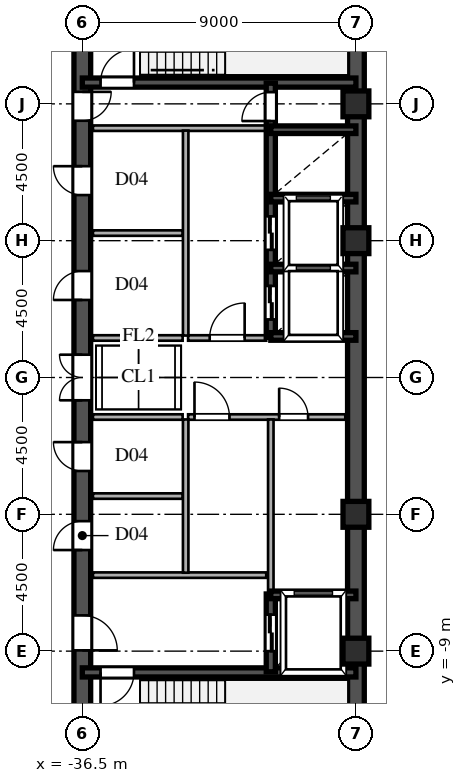
"""IFC4 building model, lengths in metres.
Left out: names, types, materials, properties, quantities, classifications, styles, units other than length and angle.
Written with IfcOpenShell. Run it as: python <this file> out.ifc"""

import sys

from ifc_helpers import new_model, si_unit, direction, frame, frame_2d, origin, origin_2d, place, context, subcontext, project, spatial, rectangle, hollow_rectangle, extrude, source, transform, mapped, element, fill, save


model = new_model("IFC4")
c1 = context("Model", 3, precision=1e-05, world=origin(), true_north=direction((0.0, 1.0)))
c2 = subcontext(c1, "Body", "Model", "MODEL_VIEW")
j1 = project(units=[si_unit("LENGTHUNIT", "METRE"), si_unit("PLANEANGLEUNIT", "RADIAN")], contexts=[c1])
p1 = place(None, origin())
s1 = spatial("IfcSite", under=j1, at=p1, CompositionType="ELEMENT")
p2 = place(p1, origin())
s2 = spatial("IfcBuilding", under=s1, at=p2, CompositionType="ELEMENT")
p3 = place(p2, frame((0.0, 0.0, 206.7)))
s3 = spatial("IfcBuildingStorey", under=s2, at=p3, CompositionType="ELEMENT", Elevation=206.7)
m1 = source(origin(), c2, "Body", "SweptSolid", [
    extrude(hollow_rectangle(XDim=0.85, YDim=0.85, WallThickness=0.036, at=origin_2d()), origin(), (0.0, 0.0, 1.0), 3.6),
])
for number, where, z_axis, x_axis in (
    (1, (-27.5, -9.0, 0.0), (0.0, 0.0, 1.0), (1.0, 0.0, 0.0)),
    (2, (-27.5, -4.5, 0.0), (0.0, 0.0, 1.0), (1.0, 0.0, 0.0)),
    (3, (-27.5, 4.5, 0.0), (0.0, 0.0, 1.0), (1.0, 0.0, 0.0)),
    (4, (-27.5, 9.0, 0.0), (0.0, 0.0, 1.0), (1.0, 0.0, 0.0)),
):
    element("IfcColumn", number, at=place(p3, frame(where, z_axis=z_axis, x_axis=x_axis)), inside=s3, PredefinedType="COLUMN", context=c2, shape_type="MappedRepresentation", body=[
        mapped(m1, transform((0.0, 0.0, 0.0), scale=1.0)),
    ])
for number, where, z_axis, x_axis in (
    (5, (-27.5, -13.5, 0.0), (0.0, 0.0, 1.0), (0.0, 1.0, 0.0)),
    (6, (-27.5, 1.3, 0.0), (0.0, 0.0, 1.0), (0.0, 1.0, 0.0)),
):
    element("IfcWall", number, at=place(p3, frame(where, z_axis=z_axis, x_axis=x_axis)), inside=s3, PredefinedType="SHEAR", context=c2, shape_type="SweptSolid", body=[
        extrude(rectangle(XDim=12.2, YDim=0.55, at=frame_2d((6.1, 0.0))), origin(), (0.0, 0.0, 1.0), 3.38),
    ])
p4 = place(p3, frame((-27.5, -1.3, 0.0), z_axis=(0.0, 0.0, 1.0), x_axis=(0.0, 1.0, 0.0)))
e7 = element("IfcWall", 7, at=p4, inside=s3, PredefinedType="SHEAR", context=c2, shape_type="SweptSolid", body=[
    extrude(rectangle(XDim=2.6, YDim=0.55, at=frame_2d((1.3, 0.0))), origin(), (0.0, 0.0, 1.0), 3.38),
])
p5 = place(p3, frame((-36.5, -13.65, 0.0), z_axis=(0.0, 0.0, 1.0), x_axis=(0.0, 1.0, 0.0)))
e8 = element("IfcWall", 8, at=p5, inside=s3, PredefinedType="SHEAR", context=c2, shape_type="SweptSolid", body=[
    extrude(rectangle(XDim=7.15, YDim=0.55, at=frame_2d((3.575, 0.0))), origin(), (0.0, 0.0, 1.0), 3.38),
])
p6 = place(p5, frame((4.675, 0.0, 0.0)))
e9 = element("IfcOpeningElement", 9, at=p6, cuts=e8, PredefinedType="OPENING", context=c2, shape_type="SweptSolid", body=[
    extrude(rectangle(XDim=1.15, YDim=2.2, at=frame_2d((0.575, 1.1))), frame((0.0, 0.285, 0.0), z_axis=(0.0, -1.0, 0.0), x_axis=(1.0, 0.0, 0.0)), (0.0, 0.0, 1.0), 0.57),
])
p7 = place(p3, frame((-36.5, -1.3, 0.0), z_axis=(0.0, 0.0, 1.0), x_axis=(0.0, 1.0, 0.0)))
e10 = element("IfcWall", 10, at=p7, inside=s3, PredefinedType="SHEAR", context=c2, shape_type="SweptSolid", body=[
    extrude(rectangle(XDim=2.6, YDim=0.55, at=frame_2d((1.3, 0.0))), origin(), (0.0, 0.0, 1.0), 3.38),
])
p8 = place(p7, frame((0.55, 0.0, 0.0)))
e11 = element("IfcOpeningElement", 11, at=p8, cuts=e10, PredefinedType="OPENING", context=c2, shape_type="SweptSolid", body=[
    extrude(rectangle(XDim=1.5, YDim=2.3, at=frame_2d((0.75, 1.15))), frame((0.0, 0.285, 0.0), z_axis=(0.0, -1.0, 0.0), x_axis=(1.0, 0.0, 0.0)), (0.0, 0.0, 1.0), 0.57),
])
p9 = place(p3, frame((-36.5, 8.2, 0.0), z_axis=(0.0, 0.0, 1.0), x_axis=(0.0, 1.0, 0.0)))
e12 = element("IfcWall", 12, at=p9, inside=s3, PredefinedType="SHEAR", context=c2, shape_type="SweptSolid", body=[
    extrude(rectangle(XDim=5.45, YDim=0.55, at=frame_2d((2.725, 0.0))), origin(), (0.0, 0.0, 1.0), 3.38),
])
p10 = place(p9, frame((0.245, 0.0, 0.0)))
e13 = element("IfcOpeningElement", 13, at=p10, cuts=e12, PredefinedType="OPENING", context=c2, shape_type="SweptSolid", body=[
    extrude(rectangle(XDim=0.95, YDim=2.15, at=frame_2d((0.475, 1.075))), frame((0.0, 0.285, 0.0), z_axis=(0.0, -1.0, 0.0), x_axis=(1.0, 0.0, 0.0)), (0.0, 0.0, 1.0), 0.57),
])
p11 = place(p3, frame((-36.5, -6.5, 0.0), z_axis=(0.0, 0.0, 1.0), x_axis=(0.0, 1.0, 0.0)))
e14 = element("IfcWall", 14, at=p11, inside=s3, PredefinedType="SHEAR", context=c2, shape_type="SweptSolid", body=[
    extrude(rectangle(XDim=2.6, YDim=0.55, at=frame_2d((1.3, 0.0))), origin(), (0.0, 0.0, 1.0), 3.38),
])
p12 = place(p11, frame((0.825, 0.0, 0.0)))
e15 = element("IfcOpeningElement", 15, at=p12, cuts=e14, PredefinedType="OPENING", context=c2, shape_type="SweptSolid", body=[
    extrude(rectangle(XDim=0.95, YDim=2.15, at=frame_2d((0.475, 1.075))), frame((0.0, 0.285, 0.0), z_axis=(0.0, -1.0, 0.0), x_axis=(1.0, 0.0, 0.0)), (0.0, 0.0, 1.0), 0.57),
])
p13 = place(p3, frame((-36.5, -3.9, 0.0), z_axis=(0.0, 0.0, 1.0), x_axis=(0.0, 1.0, 0.0)))
e16 = element("IfcWall", 16, at=p13, inside=s3, PredefinedType="SHEAR", context=c2, shape_type="SweptSolid", body=[
    extrude(rectangle(XDim=2.6, YDim=0.55, at=frame_2d((1.3, 0.0))), origin(), (0.0, 0.0, 1.0), 3.38),
])
p14 = place(p13, frame((0.825, 0.0, 0.0)))
e17 = element("IfcOpeningElement", 17, at=p14, cuts=e16, PredefinedType="OPENING", context=c2, shape_type="SweptSolid", body=[
    extrude(rectangle(XDim=0.95, YDim=2.15, at=frame_2d((0.475, 1.075))), frame((0.0, 0.285, 0.0), z_axis=(0.0, -1.0, 0.0), x_axis=(1.0, 0.0, 0.0)), (0.0, 0.0, 1.0), 0.57),
])
p15 = place(p3, frame((-36.5, 1.3, 0.0), z_axis=(0.0, 0.0, 1.0), x_axis=(0.0, 1.0, 0.0)))
e18 = element("IfcWall", 18, at=p15, inside=s3, PredefinedType="SHEAR", context=c2, shape_type="SweptSolid", body=[
    extrude(rectangle(XDim=3.45, YDim=0.55, at=frame_2d((1.725, 0.0))), origin(), (0.0, 0.0, 1.0), 3.38),
])
p16 = place(p15, frame((1.25, 0.0, 0.0)))
e19 = element("IfcOpeningElement", 19, at=p16, cuts=e18, PredefinedType="OPENING", context=c2, shape_type="SweptSolid", body=[
    extrude(rectangle(XDim=0.95, YDim=2.15, at=frame_2d((0.475, 1.075))), frame((0.0, 0.285, 0.0), z_axis=(0.0, -1.0, 0.0), x_axis=(1.0, 0.0, 0.0)), (0.0, 0.0, 1.0), 0.57),
])
p17 = place(p3, frame((-36.5, 4.75, 0.0), z_axis=(0.0, 0.0, 1.0), x_axis=(0.0, 1.0, 0.0)))
e20 = element("IfcWall", 20, at=p17, inside=s3, PredefinedType="SHEAR", context=c2, shape_type="SweptSolid", body=[
    extrude(rectangle(XDim=3.45, YDim=0.55, at=frame_2d((1.725, 0.0))), origin(), (0.0, 0.0, 1.0), 3.38),
])
p18 = place(p17, frame((1.25, 0.0, 0.0)))
e21 = element("IfcOpeningElement", 21, at=p18, cuts=e20, PredefinedType="OPENING", context=c2, shape_type="SweptSolid", body=[
    extrude(rectangle(XDim=0.95, YDim=2.15, at=frame_2d((0.475, 1.075))), frame((0.0, 0.285, 0.0), z_axis=(0.0, -1.0, 0.0), x_axis=(1.0, 0.0, 0.0)), (0.0, 0.0, 1.0), 0.57),
])
p19 = place(p3, frame((-36.5, -9.7, 0.0), z_axis=(0.0, 0.0, 1.0), x_axis=(1.0, 0.0, 0.0)))
e22 = element("IfcWall", 22, at=p19, inside=s3, PredefinedType="SHEAR", context=c2, shape_type="SweptSolid", body=[
    extrude(rectangle(XDim=9.0, YDim=0.3, at=frame_2d((4.5, 0.0))), origin(), (0.0, 0.0, 1.0), 3.38),
])
p20 = place(p19, frame((0.6, 0.0, 0.0)))
e23 = element("IfcOpeningElement", 23, at=p20, cuts=e22, PredefinedType="OPENING", context=c2, shape_type="SweptSolid", body=[
    extrude(rectangle(XDim=1.1, YDim=2.2, at=frame_2d((0.55, 1.1))), frame((0.0, 0.16, 0.0), z_axis=(0.0, -1.0, 0.0), x_axis=(1.0, 0.0, 0.0)), (0.0, 0.0, 1.0), 0.32),
])
p21 = place(p3, frame((-36.5, 9.7, 0.0), z_axis=(0.0, 0.0, 1.0), x_axis=(1.0, 0.0, 0.0)))
e24 = element("IfcWall", 24, at=p21, inside=s3, PredefinedType="SHEAR", context=c2, shape_type="SweptSolid", body=[
    extrude(rectangle(XDim=9.0, YDim=0.3, at=frame_2d((4.5, 0.0))), origin(), (0.0, 0.0, 1.0), 3.38),
])
p22 = place(p21, frame((0.6, 0.0, 0.0)))
e25 = element("IfcOpeningElement", 25, at=p22, cuts=e24, PredefinedType="OPENING", context=c2, shape_type="SweptSolid", body=[
    extrude(rectangle(XDim=1.1, YDim=2.2, at=frame_2d((0.55, 1.1))), frame((0.0, 0.16, 0.0), z_axis=(0.0, -1.0, 0.0), x_axis=(1.0, 0.0, 0.0)), (0.0, 0.0, 1.0), 0.32),
])
for number, where, z_axis, x_axis in (
    (26, (-30.3, -7.15, 0.0), (0.0, 0.0, 1.0), (1.0, 0.0, 0.0)),
    (27, (-30.3, 1.35, 0.0), (0.0, 0.0, 1.0), (1.0, 0.0, 0.0)),
    (28, (-30.3, 3.6, 0.0), (0.0, 0.0, 1.0), (1.0, 0.0, 0.0)),
    (29, (-30.3, 5.9, 0.0), (0.0, 0.0, 1.0), (1.0, 0.0, 0.0)),
    (30, (-30.3, 8.15, 0.0), (0.0, 0.0, 1.0), (1.0, 0.0, 0.0)),
):
    element("IfcWall", number, at=place(p3, frame(where, z_axis=z_axis, x_axis=x_axis)), inside=s3, PredefinedType="SHEAR", context=c2, shape_type="SweptSolid", body=[
        extrude(rectangle(XDim=2.8, YDim=0.25, at=frame_2d((1.4, 0.0))), origin(), (0.0, 0.0, 1.0), 3.38),
    ])
p23 = place(p3, frame((-30.3, -9.68, 0.0), z_axis=(0.0, 0.0, 1.0), x_axis=(0.0, 1.0, 0.0)))
e31 = element("IfcWall", 31, at=p23, inside=s3, PredefinedType="SHEAR", context=c2, shape_type="SweptSolid", body=[
    extrude(rectangle(XDim=2.56, YDim=0.3, at=frame_2d((1.28, 0.0))), origin(), (0.0, 0.0, 1.0), 3.38),
])
p24 = place(p23, frame((0.68, 0.0, 0.0)))
e32 = element("IfcOpeningElement", 32, at=p24, cuts=e31, PredefinedType="OPENING", context=c2, shape_type="SweptSolid", body=[
    extrude(rectangle(XDim=1.2, YDim=2.25, at=frame_2d((0.6, 1.125))), frame((0.0, 0.16, 0.0), z_axis=(0.0, -1.0, 0.0), x_axis=(1.0, 0.0, 0.0)), (0.0, 0.0, 1.0), 0.32),
])
p25 = place(p3, frame((-30.3, 1.32, 0.0), z_axis=(0.0, 0.0, 1.0), x_axis=(0.0, 1.0, 0.0)))
e33 = element("IfcWall", 33, at=p25, inside=s3, PredefinedType="SHEAR", context=c2, shape_type="SweptSolid", body=[
    extrude(rectangle(XDim=2.28, YDim=0.3, at=frame_2d((1.14, 0.0))), origin(), (0.0, 0.0, 1.0), 3.38),
])
p26 = place(p25, frame((0.59, 0.0, 0.0)))
e34 = element("IfcOpeningElement", 34, at=p26, cuts=e33, PredefinedType="OPENING", context=c2, shape_type="SweptSolid", body=[
    extrude(rectangle(XDim=1.1, YDim=2.2, at=frame_2d((0.55, 1.1))), frame((0.0, 0.16, 0.0), z_axis=(0.0, -1.0, 0.0), x_axis=(1.0, 0.0, 0.0)), (0.0, 0.0, 1.0), 0.32),
])
p27 = place(p3, frame((-30.3, 3.6, 0.0), z_axis=(0.0, 0.0, 1.0), x_axis=(0.0, 1.0, 0.0)))
e35 = element("IfcWall", 35, at=p27, inside=s3, PredefinedType="SHEAR", context=c2, shape_type="SweptSolid", body=[
    extrude(rectangle(XDim=2.3, YDim=0.3, at=frame_2d((1.15, 0.0))), origin(), (0.0, 0.0, 1.0), 3.38),
])
p28 = place(p27, frame((0.6, 0.0, 0.0)))
e36 = element("IfcOpeningElement", 36, at=p28, cuts=e35, PredefinedType="OPENING", context=c2, shape_type="SweptSolid", body=[
    extrude(rectangle(XDim=1.1, YDim=2.2, at=frame_2d((0.55, 1.1))), frame((0.0, 0.16, 0.0), z_axis=(0.0, -1.0, 0.0), x_axis=(1.0, 0.0, 0.0)), (0.0, 0.0, 1.0), 0.32),
])
p29 = place(p3, frame((-30.3, 5.9, 0.0), z_axis=(0.0, 0.0, 1.0), x_axis=(0.0, 1.0, 0.0)))
e37 = element("IfcWall", 37, at=p29, inside=s3, PredefinedType="SHEAR", context=c2, shape_type="SweptSolid", body=[
    extrude(rectangle(XDim=2.25, YDim=0.3, at=frame_2d((1.125, 0.0))), origin(), (0.0, 0.0, 1.0), 3.38),
])
p30 = place(p3, frame((-30.3, 8.15, 0.0), z_axis=(0.0, 0.0, 1.0), x_axis=(0.0, 1.0, 0.0)))
e38 = element("IfcWall", 38, at=p30, inside=s3, PredefinedType="SHEAR", context=c2, shape_type="SweptSolid", body=[
    extrude(rectangle(XDim=1.53, YDim=0.3, at=frame_2d((0.765, 0.0))), origin(), (0.0, 0.0, 1.0), 3.38),
])
p31 = place(p30, frame((0.285, 0.0, 0.0)))
e39 = element("IfcOpeningElement", 39, at=p31, cuts=e38, PredefinedType="OPENING", context=c2, shape_type="SweptSolid", body=[
    extrude(rectangle(XDim=0.95, YDim=2.15, at=frame_2d((0.475, 1.075))), frame((0.0, 0.16, 0.0), z_axis=(0.0, -1.0, 0.0), x_axis=(1.0, 0.0, 0.0)), (0.0, 0.0, 1.0), 0.32),
])
for number, where, z_axis, x_axis in (
    (40, (-36.15, -6.5, 0.0), (0.0, 0.0, 1.0), (1.0, 0.0, 0.0)),
    (41, (-36.15, 8.2, 0.0), (0.0, 0.0, 1.0), (1.0, 0.0, 0.0)),
):
    element("IfcWall", number, at=place(p3, frame(where, z_axis=z_axis, x_axis=x_axis)), inside=s3, PredefinedType="PARTITIONING", context=c2, shape_type="SweptSolid", body=[
        extrude(rectangle(XDim=5.7, YDim=0.18, at=frame_2d((2.85, 0.0))), origin(), (0.0, 0.0, 1.0), 3.38),
    ])
p32 = place(p3, frame((-33.1, -6.42, 0.0), z_axis=(0.0, 0.0, 1.0), x_axis=(0.0, 1.0, 0.0)))
e42 = element("IfcWall", 42, at=p32, inside=s3, PredefinedType="PARTITIONING", context=c2, shape_type="SweptSolid", body=[
    extrude(rectangle(XDim=5.04, YDim=0.18, at=frame_2d((2.52, 0.0))), origin(), (0.0, 0.0, 1.0), 3.38),
])
p33 = place(p3, frame((-33.1, 1.38, 0.0), z_axis=(0.0, 0.0, 1.0), x_axis=(0.0, 1.0, 0.0)))
e43 = element("IfcWall", 43, at=p33, inside=s3, PredefinedType="PARTITIONING", context=c2, shape_type="SweptSolid", body=[
    extrude(rectangle(XDim=6.74, YDim=0.18, at=frame_2d((3.37, 0.0))), origin(), (0.0, 0.0, 1.0), 3.38),
])
p34 = place(p3, frame((-30.3, -1.3, 0.0), z_axis=(0.0, 0.0, 1.0), x_axis=(1.0, 0.0, 0.0)))
e44 = element("IfcWall", 44, at=p34, inside=s3, PredefinedType="PARTITIONING", context=c2, shape_type="SweptSolid", body=[
    extrude(rectangle(XDim=2.45, YDim=0.18, at=frame_2d((1.225, 0.0))), origin(), (0.0, 0.0, 1.0), 3.38),
])
p35 = place(p34, frame((0.275, 0.0, 0.0)))
e45 = element("IfcOpeningElement", 45, at=p35, cuts=e44, PredefinedType="OPENING", context=c2, shape_type="SweptSolid", body=[
    extrude(rectangle(XDim=0.95, YDim=2.15, at=frame_2d((0.475, 1.075))), frame((0.0, 0.1, 0.0), z_axis=(0.0, -1.0, 0.0), x_axis=(1.0, 0.0, 0.0)), (0.0, 0.0, 1.0), 0.2),
])
p36 = place(p3, frame((-33.02, -1.3, 0.0), z_axis=(0.0, 0.0, 1.0), x_axis=(1.0, 0.0, 0.0)))
e46 = element("IfcWall", 46, at=p36, inside=s3, PredefinedType="PARTITIONING", context=c2, shape_type="SweptSolid", body=[
    extrude(rectangle(XDim=2.72, YDim=0.18, at=frame_2d((1.36, 0.0))), origin(), (0.0, 0.0, 1.0), 3.38),
])
p37 = place(p36, frame((0.21, 0.0, 0.0)))
e47 = element("IfcOpeningElement", 47, at=p37, cuts=e46, PredefinedType="OPENING", context=c2, shape_type="SweptSolid", body=[
    extrude(rectangle(XDim=1.15, YDim=2.2, at=frame_2d((0.575, 1.1))), frame((0.0, 0.1, 0.0), z_axis=(0.0, -1.0, 0.0), x_axis=(1.0, 0.0, 0.0)), (0.0, 0.0, 1.0), 0.2),
])
p38 = place(p3, frame((-30.3, -7.12, 0.0), z_axis=(0.0, 0.0, 1.0), x_axis=(0.0, 1.0, 0.0)))
e48 = element("IfcWall", 48, at=p38, inside=s3, PredefinedType="PARTITIONING", context=c2, shape_type="SweptSolid", body=[
    extrude(rectangle(XDim=5.74, YDim=0.18, at=frame_2d((2.87, 0.0))), origin(), (0.0, 0.0, 1.0), 3.38),
])
p39 = place(p3, frame((-33.02, 1.3, 0.0), z_axis=(0.0, 0.0, 1.0), x_axis=(1.0, 0.0, 0.0)))
e49 = element("IfcWall", 49, at=p39, inside=s3, PredefinedType="PARTITIONING", context=c2, shape_type="SweptSolid", body=[
    extrude(rectangle(XDim=2.57, YDim=0.18, at=frame_2d((1.285, 0.0))), origin(), (0.0, 0.0, 1.0), 3.38),
])
p40 = place(p39, frame((0.71, 0.0, 0.0)))
e50 = element("IfcOpeningElement", 50, at=p40, cuts=e49, PredefinedType="OPENING", context=c2, shape_type="SweptSolid", body=[
    extrude(rectangle(XDim=1.15, YDim=2.2, at=frame_2d((0.575, 1.1))), frame((0.0, 0.1, 0.0), z_axis=(0.0, -1.0, 0.0), x_axis=(1.0, 0.0, 0.0)), (0.0, 0.0, 1.0), 0.2),
])
for number, where, z_axis, x_axis in (
    (51, (-36.15, -1.3, 0.0), (0.0, 0.0, 1.0), (1.0, 0.0, 0.0)),
    (52, (-36.15, 1.3, 0.0), (0.0, 0.0, 1.0), (1.0, 0.0, 0.0)),
    (53, (-36.15, -3.9, 0.0), (0.0, 0.0, 1.0), (1.0, 0.0, 0.0)),
    (54, (-36.15, 4.75, 0.0), (0.0, 0.0, 1.0), (1.0, 0.0, 0.0)),
):
    element("IfcWall", number, at=place(p3, frame(where, z_axis=z_axis, x_axis=x_axis)), inside=s3, PredefinedType="PARTITIONING", context=c2, shape_type="SweptSolid", body=[
        extrude(rectangle(XDim=2.95, YDim=0.18, at=frame_2d((1.475, 0.0))), origin(), (0.0, 0.0, 1.0), 3.38),
    ])
m2 = source(origin(), c2, "Body", "SweptSolid", [
    extrude(rectangle(XDim=1.15, YDim=2.2, at=frame_2d((0.575, 1.1))), frame((0.0, 0.025, 0.0), z_axis=(0.0, -1.0, 0.0), x_axis=(1.0, 0.0, 0.0)), (0.0, 0.0, 1.0), 0.05),
])
p41 = place(p6, frame((1.15, 0.0, 0.0), z_axis=(0.0, 0.0, 1.0), x_axis=(-1.0, 0.0, 0.0)))
e55 = element("IfcDoor", 55, at=p41, inside=s3, OperationType="SINGLE_SWING_LEFT", PredefinedType="DOOR", context=c2, shape_type="MappedRepresentation", body=[
    mapped(m2, transform((0.0, 0.0, 0.0), scale=1.0)),
])
fill(e9, e55)
m3 = source(origin(), c2, "Body", "SweptSolid", [
    extrude(rectangle(XDim=1.5, YDim=2.3, at=frame_2d((0.75, 1.15))), frame((0.0, 0.025, 0.0), z_axis=(0.0, -1.0, 0.0), x_axis=(1.0, 0.0, 0.0)), (0.0, 0.0, 1.0), 0.05),
])
p42 = place(p8, origin())
e56 = element("IfcDoor", 56, at=p42, inside=s3, OperationType="DOUBLE_SWING_LEFT", PredefinedType="DOOR", context=c2, shape_type="MappedRepresentation", body=[
    mapped(m3, transform((0.0, 0.0, 0.0), scale=1.0)),
])
fill(e11, e56)
m4 = source(origin(), c2, "Body", "SweptSolid", [
    extrude(rectangle(XDim=0.95, YDim=2.15, at=frame_2d((0.475, 1.075))), frame((0.0, 0.025, 0.0), z_axis=(0.0, -1.0, 0.0), x_axis=(1.0, 0.0, 0.0)), (0.0, 0.0, 1.0), 0.05),
])
p43 = place(p10, frame((0.95, 0.0, 0.0), z_axis=(0.0, 0.0, 1.0), x_axis=(-1.0, 0.0, 0.0)))
e57 = element("IfcDoor", 57, at=p43, inside=s3, OperationType="SINGLE_SWING_RIGHT", PredefinedType="DOOR", context=c2, shape_type="MappedRepresentation", body=[
    mapped(m4, transform((0.0, 0.0, 0.0), scale=1.0)),
])
fill(e13, e57)
p44 = place(p12, origin())
e58 = element("IfcDoor", 58, at=p44, inside=s3, OperationType="SINGLE_SWING_LEFT", PredefinedType="DOOR", context=c2, shape_type="MappedRepresentation", body=[
    mapped(m4, transform((0.0, 0.0, 0.0), scale=1.0)),
])
fill(e15, e58)
p45 = place(p14, origin())
e59 = element("IfcDoor", 59, at=p45, inside=s3, OperationType="SINGLE_SWING_RIGHT", PredefinedType="DOOR", context=c2, shape_type="MappedRepresentation", body=[
    mapped(m4, transform((0.0, 0.0, 0.0), scale=1.0)),
])
fill(e17, e59)
p46 = place(p16, origin())
e60 = element("IfcDoor", 60, at=p46, inside=s3, OperationType="SINGLE_SWING_LEFT", PredefinedType="DOOR", context=c2, shape_type="MappedRepresentation", body=[
    mapped(m4, transform((0.0, 0.0, 0.0), scale=1.0)),
])
fill(e19, e60)
p47 = place(p18, origin())
e61 = element("IfcDoor", 61, at=p47, inside=s3, OperationType="SINGLE_SWING_RIGHT", PredefinedType="DOOR", context=c2, shape_type="MappedRepresentation", body=[
    mapped(m4, transform((0.0, 0.0, 0.0), scale=1.0)),
])
fill(e21, e61)
m5 = source(origin(), c2, "Body", "SweptSolid", [
    extrude(rectangle(XDim=1.1, YDim=2.2, at=frame_2d((0.55, 1.1))), frame((0.0, 0.025, 0.0), z_axis=(0.0, -1.0, 0.0), x_axis=(1.0, 0.0, 0.0)), (0.0, 0.0, 1.0), 0.05),
])
p48 = place(p20, frame((1.1, 0.0, 0.0), z_axis=(0.0, 0.0, 1.0), x_axis=(-1.0, 0.0, 0.0)))
e62 = element("IfcDoor", 62, at=p48, inside=s3, OperationType="SINGLE_SWING_LEFT", PredefinedType="DOOR", context=c2, shape_type="MappedRepresentation", body=[
    mapped(m5, transform((0.0, 0.0, 0.0), scale=1.0)),
])
fill(e23, e62)
p49 = place(p22, origin())
e63 = element("IfcDoor", 63, at=p49, inside=s3, OperationType="SINGLE_SWING_RIGHT", PredefinedType="DOOR", context=c2, shape_type="MappedRepresentation", body=[
    mapped(m5, transform((0.0, 0.0, 0.0), scale=1.0)),
])
fill(e25, e63)
m6 = source(origin(), c2, "Body", "SweptSolid", [
    extrude(rectangle(XDim=1.2, YDim=2.25, at=frame_2d((0.6, 1.125))), frame((0.0, 0.025, 0.0), z_axis=(0.0, -1.0, 0.0), x_axis=(1.0, 0.0, 0.0)), (0.0, 0.0, 1.0), 0.05),
])
p50 = place(p24, origin())
e64 = element("IfcDoor", 64, at=p50, inside=s3, OperationType="DOUBLE_DOOR_SLIDING", PredefinedType="DOOR", context=c2, shape_type="MappedRepresentation", body=[
    mapped(m6, transform((0.0, 0.0, 0.0), scale=1.0)),
])
fill(e32, e64)
m7 = source(origin(), c2, "Body", "SweptSolid", [
    extrude(rectangle(XDim=1.1, YDim=2.2, at=frame_2d((0.55, 1.1))), frame((0.0, 0.025, 0.0), z_axis=(0.0, -1.0, 0.0), x_axis=(1.0, 0.0, 0.0)), (0.0, 0.0, 1.0), 0.05),
])
p51 = place(p26, origin())
e65 = element("IfcDoor", 65, at=p51, inside=s3, OperationType="DOUBLE_DOOR_SLIDING", PredefinedType="DOOR", context=c2, shape_type="MappedRepresentation", body=[
    mapped(m7, transform((0.0, 0.0, 0.0), scale=1.0)),
])
fill(e34, e65)
p52 = place(p28, origin())
e66 = element("IfcDoor", 66, at=p52, inside=s3, OperationType="DOUBLE_DOOR_SLIDING", PredefinedType="DOOR", context=c2, shape_type="MappedRepresentation", body=[
    mapped(m7, transform((0.0, 0.0, 0.0), scale=1.0)),
])
fill(e36, e66)
p53 = place(p31, origin())
e67 = element("IfcDoor", 67, at=p53, inside=s3, OperationType="SINGLE_SWING_LEFT", PredefinedType="DOOR", context=c2, shape_type="MappedRepresentation", body=[
    mapped(m4, transform((0.0, 0.0, 0.0), scale=1.0)),
])
fill(e39, e67)
p54 = place(p35, origin())
e68 = element("IfcDoor", 68, at=p54, inside=s3, OperationType="SINGLE_SWING_LEFT", PredefinedType="DOOR", context=c2, shape_type="MappedRepresentation", body=[
    mapped(m4, transform((0.0, 0.0, 0.0), scale=1.0)),
])
fill(e45, e68)
p55 = place(p37, origin())
e69 = element("IfcDoor", 69, at=p55, inside=s3, OperationType="SINGLE_SWING_LEFT", PredefinedType="DOOR", context=c2, shape_type="MappedRepresentation", body=[
    mapped(m2, transform((0.0, 0.0, 0.0), scale=1.0)),
])
fill(e47, e69)
p56 = place(p40, origin())
e70 = element("IfcDoor", 70, at=p56, inside=s3, OperationType="SINGLE_SWING_RIGHT", PredefinedType="DOOR", context=c2, shape_type="MappedRepresentation", body=[
    mapped(m2, transform((0.0, 0.0, 0.0), scale=1.0)),
])
fill(e50, e70)
save(model, sys.argv[1])
